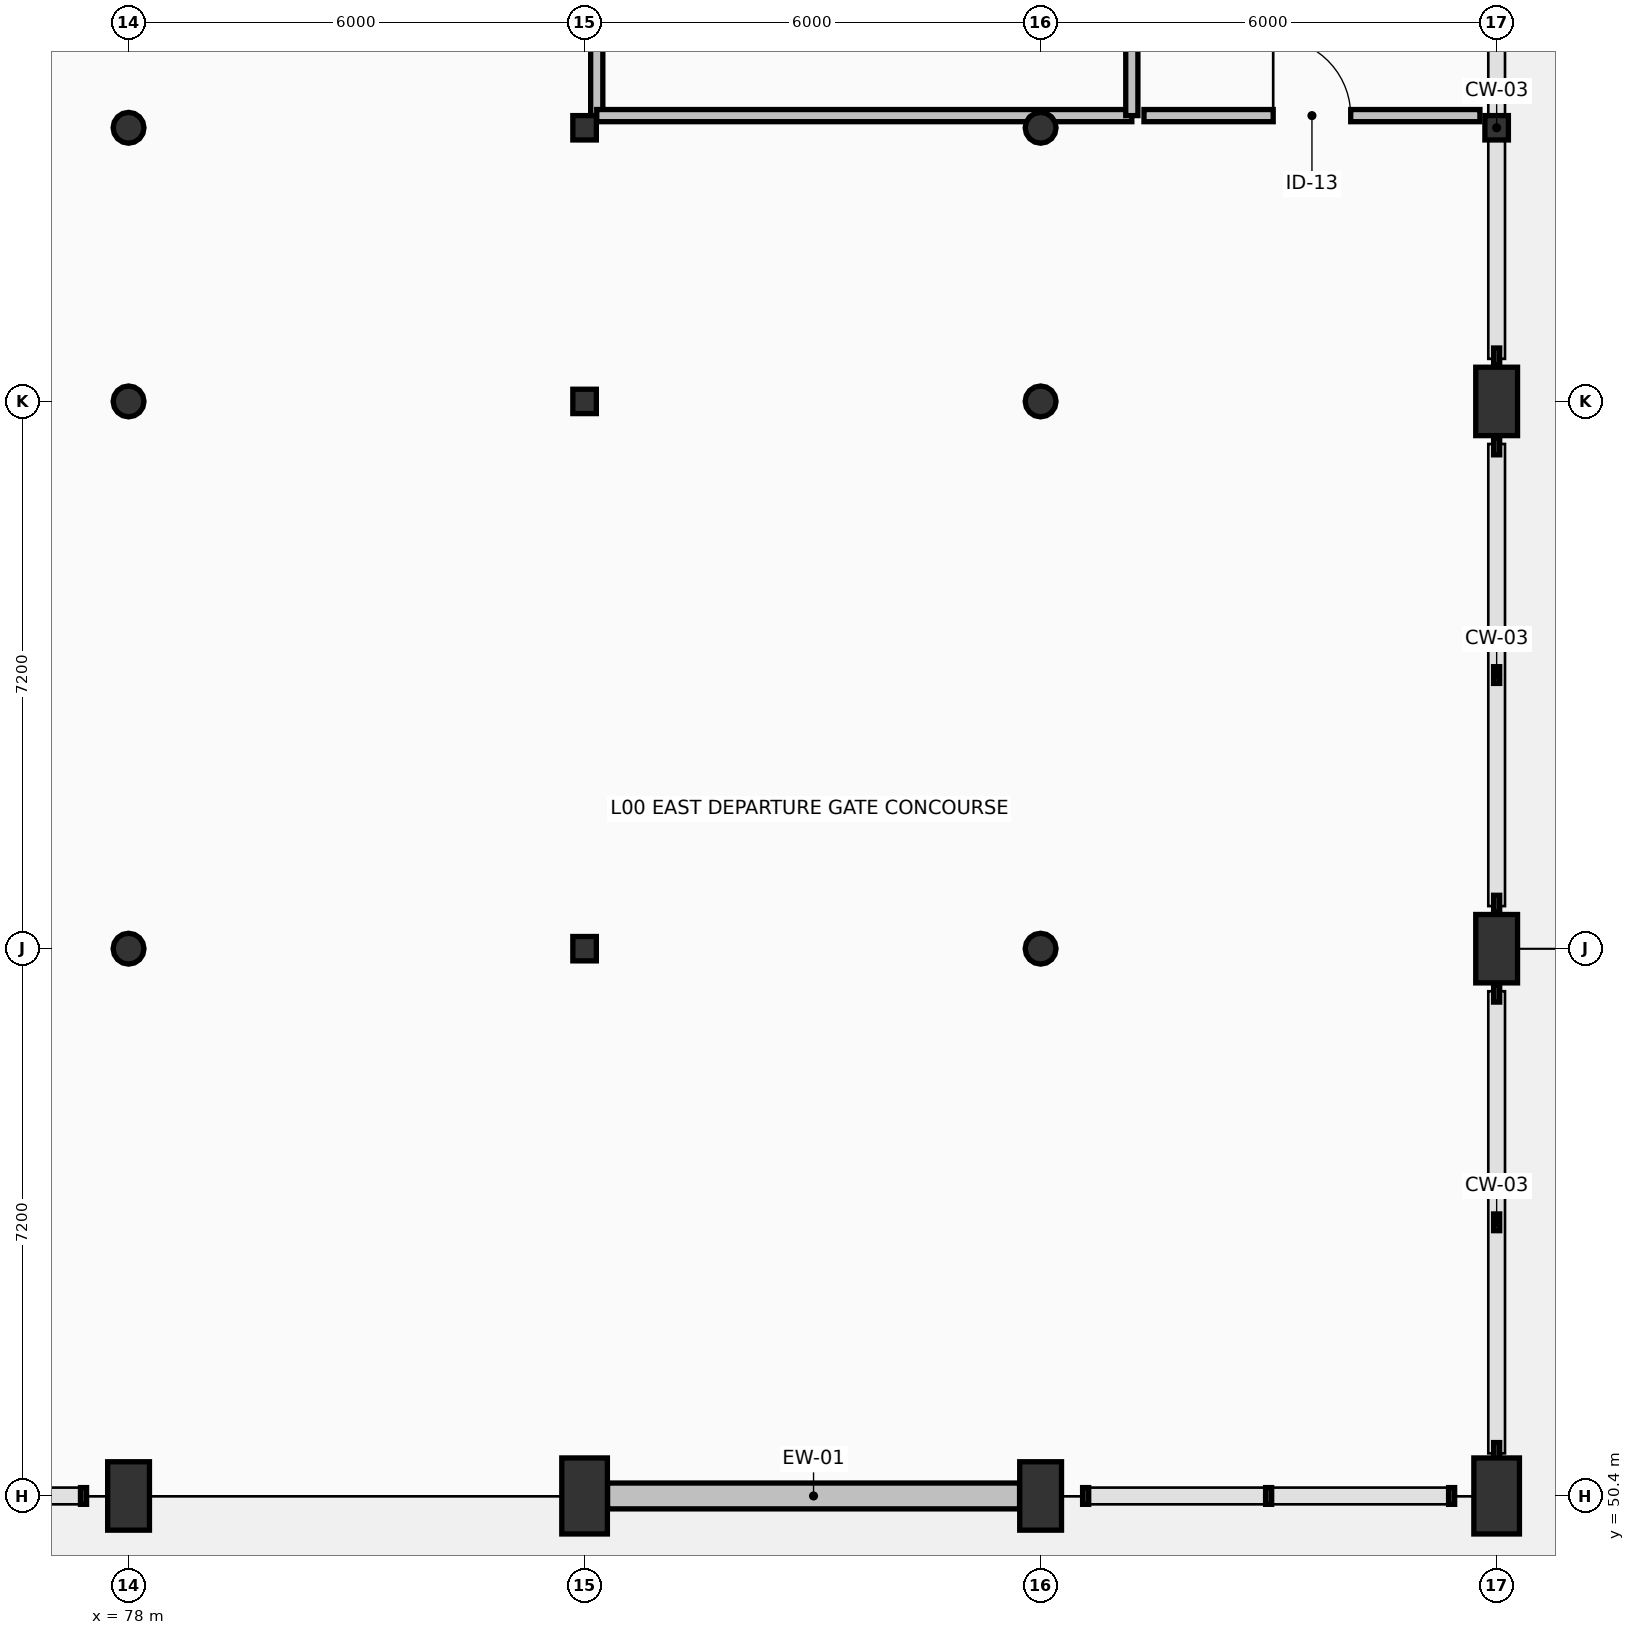
"""IFC4 building model, lengths in metres.
Left out: names, types, materials, properties, quantities, classifications, styles, units other than length and angle.
Written with IfcOpenShell. Run it as: python <this file> out.ifc"""

import sys

from ifc_helpers import new_model, si_unit, direction, frame, frame_2d, origin, origin_2d, place, context, subcontext, project, spatial, rectangle, hollow_circle, i_section, extrude, element, fill, save


model = new_model("IFC4")
c1 = context("Model", 3, precision=1e-05, world=origin(), true_north=direction((0.0, 1.0)))
c2 = subcontext(c1, "Body", "Model", "MODEL_VIEW")
j1 = project(units=[si_unit("LENGTHUNIT", "METRE"), si_unit("PLANEANGLEUNIT", "RADIAN")], contexts=[c1])
p1 = place(None, origin())
s1 = spatial("IfcSite", under=j1, at=p1, CompositionType="ELEMENT")
p2 = place(p1, origin())
s2 = spatial("IfcBuilding", under=s1, at=p2, CompositionType="ELEMENT")
p3 = place(p2, origin())
s3 = spatial("IfcBuildingStorey", under=s2, at=p3, CompositionType="ELEMENT", Elevation=0.0)
p4 = place(p3, frame((78.0, 50.4, -0.32), z_axis=(0.0, 0.0, 1.0), x_axis=(1.0, 0.0, 0.0)))
e1 = element("IfcColumn", 1, at=p4, inside=s3, PredefinedType="COLUMN", context=c2, shape_type="SweptSolid", body=[
    extrude(rectangle(XDim=0.55, YDim=0.9, at=origin_2d()), origin(), (0.0, 0.0, 1.0), 6.08),
])
p5 = place(p3, frame((84.0, 50.4, -0.32), z_axis=(0.0, 0.0, 1.0), x_axis=(1.0, 0.0, 0.0)))
e2 = element("IfcColumn", 2, at=p5, inside=s3, PredefinedType="COLUMN", context=c2, shape_type="SweptSolid", body=[
    extrude(rectangle(XDim=0.6, YDim=1.0, at=origin_2d()), origin(), (0.0, 0.0, 1.0), 6.08),
])
p6 = place(p3, frame((90.0, 50.4, -0.32), z_axis=(0.0, 0.0, 1.0), x_axis=(1.0, 0.0, 0.0)))
e3 = element("IfcColumn", 3, at=p6, inside=s3, PredefinedType="COLUMN", context=c2, shape_type="SweptSolid", body=[
    extrude(rectangle(XDim=0.55, YDim=0.9, at=origin_2d()), origin(), (0.0, 0.0, 1.0), 6.08),
])
p7 = place(p3, frame((96.0, 50.4, -0.32), z_axis=(0.0, 0.0, 1.0), x_axis=(1.0, 0.0, 0.0)))
e4 = element("IfcColumn", 4, at=p7, inside=s3, PredefinedType="COLUMN", context=c2, shape_type="SweptSolid", body=[
    extrude(rectangle(XDim=0.6, YDim=1.0, at=origin_2d()), origin(), (0.0, 0.0, 1.0), 6.08),
])
for number, where, z_axis, x_axis in (
    (5, (96.0, 57.6, -0.32), (0.0, 0.0, 1.0), (1.0, 0.0, 0.0)),
    (6, (96.0, 64.8, -0.32), (0.0, 0.0, 1.0), (1.0, 0.0, 0.0)),
):
    element("IfcColumn", number, at=place(p3, frame(where, z_axis=z_axis, x_axis=x_axis)), inside=s3, PredefinedType="COLUMN", context=c2, shape_type="SweptSolid", body=[
        extrude(rectangle(XDim=0.55, YDim=0.9, at=origin_2d()), origin(), (0.0, 0.0, 1.0), 6.08),
    ])
for number, where, z_axis, x_axis in (
    (7, (78.0, 57.6, -0.32), (0.0, 0.0, 1.0), (1.0, 0.0, 0.0)),
    (8, (78.0, 64.8, -0.32), (0.0, 0.0, 1.0), (1.0, 0.0, 0.0)),
    (9, (78.0, 68.4, -0.32), (0.0, 0.0, 1.0), (1.0, 0.0, 0.0)),
):
    element("IfcColumn", number, at=place(p3, frame(where, z_axis=z_axis, x_axis=x_axis)), inside=s3, PredefinedType="COLUMN", context=c2, shape_type="SweptSolid", body=[
        extrude(hollow_circle(Radius=0.203, WallThickness=0.016, at=origin_2d()), origin(), (0.0, 0.0, 1.0), 5.8),
    ])
for number, where, z_axis, x_axis in (
    (10, (84.0, 57.6, -0.32), (0.0, 0.0, 1.0), (1.0, 0.0, 0.0)),
    (11, (84.0, 64.8, -0.32), (0.0, 0.0, 1.0), (1.0, 0.0, 0.0)),
    (12, (84.0, 68.4, -0.32), (0.0, 0.0, 1.0), (1.0, 0.0, 0.0)),
):
    element("IfcColumn", number, at=place(p3, frame(where, z_axis=z_axis, x_axis=x_axis)), inside=s3, PredefinedType="COLUMN", context=c2, shape_type="SweptSolid", body=[
        extrude(i_section(OverallWidth=0.309, OverallDepth=0.321, WebThickness=0.014, FlangeThickness=0.022, FilletRadius=0.015, at=origin_2d()), origin(), (0.0, 0.0, 1.0), 5.8),
    ])
for number, where, z_axis, x_axis in (
    (13, (90.0, 57.6, -0.32), (0.0, 0.0, 1.0), (1.0, 0.0, 0.0)),
    (14, (90.0, 64.8, -0.32), (0.0, 0.0, 1.0), (1.0, 0.0, 0.0)),
    (15, (90.0, 68.4, -0.32), (0.0, 0.0, 1.0), (1.0, 0.0, 0.0)),
):
    element("IfcColumn", number, at=place(p3, frame(where, z_axis=z_axis, x_axis=x_axis)), inside=s3, PredefinedType="COLUMN", context=c2, shape_type="SweptSolid", body=[
        extrude(hollow_circle(Radius=0.203, WallThickness=0.016, at=origin_2d()), origin(), (0.0, 0.0, 1.0), 5.8),
    ])
p8 = place(p3, frame((96.0, 68.4, -0.32), z_axis=(0.0, 0.0, 1.0), x_axis=(1.0, 0.0, 0.0)))
e16 = element("IfcColumn", 16, at=p8, inside=s3, PredefinedType="COLUMN", context=c2, shape_type="SweptSolid", body=[
    extrude(i_section(OverallWidth=0.309, OverallDepth=0.321, WebThickness=0.014, FlangeThickness=0.022, FilletRadius=0.015, at=origin_2d()), origin(), (0.0, 0.0, 1.0), 5.8),
])
p9 = place(p3, frame((84.302, 50.4, 0.0), z_axis=(0.0, 0.0, 1.0), x_axis=(1.0, 0.0, 0.0)))
e17 = element("IfcWall", 17, at=p9, inside=s3, PredefinedType="SOLIDWALL", context=c2, shape_type="SweptSolid", body=[
    extrude(rectangle(XDim=5.421, YDim=0.34, at=frame_2d((2.71, 0.0))), origin(), (0.0, 0.0, 1.0), 4.937),
])
p10 = place(p3, frame((84.16, 72.74, 0.0), z_axis=(0.0, 0.0, 1.0), x_axis=(0.0, -1.0, 0.0)))
e18 = element("IfcWall", 18, at=p10, inside=s3, PredefinedType="PARTITIONING", context=c2, shape_type="SweptSolid", body=[
    extrude(rectangle(XDim=4.18, YDim=0.16, at=frame_2d((2.09, 0.0))), origin(), (0.0, 0.0, 1.0), 4.937),
])
p11 = place(p3, frame((84.16, 68.56, 0.0), z_axis=(0.0, 0.0, 1.0), x_axis=(1.0, 0.0, 0.0)))
e19 = element("IfcWall", 19, at=p11, inside=s3, PredefinedType="PARTITIONING", context=c2, shape_type="SweptSolid", body=[
    extrude(rectangle(XDim=7.04, YDim=0.16, at=frame_2d((3.52, 0.0))), origin(), (0.0, 0.0, 1.0), 5.064),
])
p12 = place(p3, frame((91.2, 68.56, 0.0), z_axis=(0.0, 0.0, 1.0), x_axis=(0.0, 1.0, 0.0)))
e20 = element("IfcWall", 20, at=p12, inside=s3, PredefinedType="PARTITIONING", context=c2, shape_type="SweptSolid", body=[
    extrude(rectangle(XDim=10.64, YDim=0.16, at=frame_2d((5.32, 0.0))), origin(), (0.0, 0.0, 1.0), 5.2),
])
p13 = place(p12, frame((4.86, 0.0, 0.0)))
e21 = element("IfcOpeningElement", 21, at=p13, cuts=e20, PredefinedType="OPENING", context=c2, shape_type="SweptSolid", body=[
    extrude(rectangle(XDim=0.92, YDim=2.1, at=frame_2d((0.46, 1.05))), frame((0.0, 0.09, 0.0), z_axis=(0.0, -1.0, 0.0), x_axis=(1.0, 0.0, 0.0)), (0.0, 0.0, 1.0), 0.18),
])
p14 = place(p3, frame((91.36, 68.56, 0.0), z_axis=(0.0, 0.0, 1.0), x_axis=(1.0, 0.0, 0.0)))
e22 = element("IfcWall", 22, at=p14, inside=s3, PredefinedType="PARTITIONING", context=c2, shape_type="SweptSolid", body=[
    extrude(rectangle(XDim=4.42, YDim=0.16, at=frame_2d((2.21, 0.0))), origin(), (0.0, 0.0, 1.0), 5.08),
])
p15 = place(p14, frame((1.7, 0.0, 0.0)))
e23 = element("IfcOpeningElement", 23, at=p15, cuts=e22, PredefinedType="OPENING", context=c2, shape_type="SweptSolid", body=[
    extrude(rectangle(XDim=1.02, YDim=2.1, at=frame_2d((0.51, 1.05))), frame((0.0, 0.09, 0.0), z_axis=(0.0, -1.0, 0.0), x_axis=(1.0, 0.0, 0.0)), (0.0, 0.0, 1.0), 0.18),
])
p16 = place(p15, origin())
e24 = element("IfcDoor", 24, at=p16, inside=s3, OperationType="SINGLE_SWING_LEFT", PredefinedType="DOOR", context=c2, shape_type="SweptSolid", body=[
    extrude(rectangle(XDim=1.02, YDim=2.1, at=frame_2d((0.51, 1.05))), frame((0.0, 0.025, 0.0), z_axis=(0.0, -1.0, 0.0), x_axis=(1.0, 0.0, 0.0)), (0.0, 0.0, 1.0), 0.05),
])
fill(e23, e24)
save(model, sys.argv[1])
